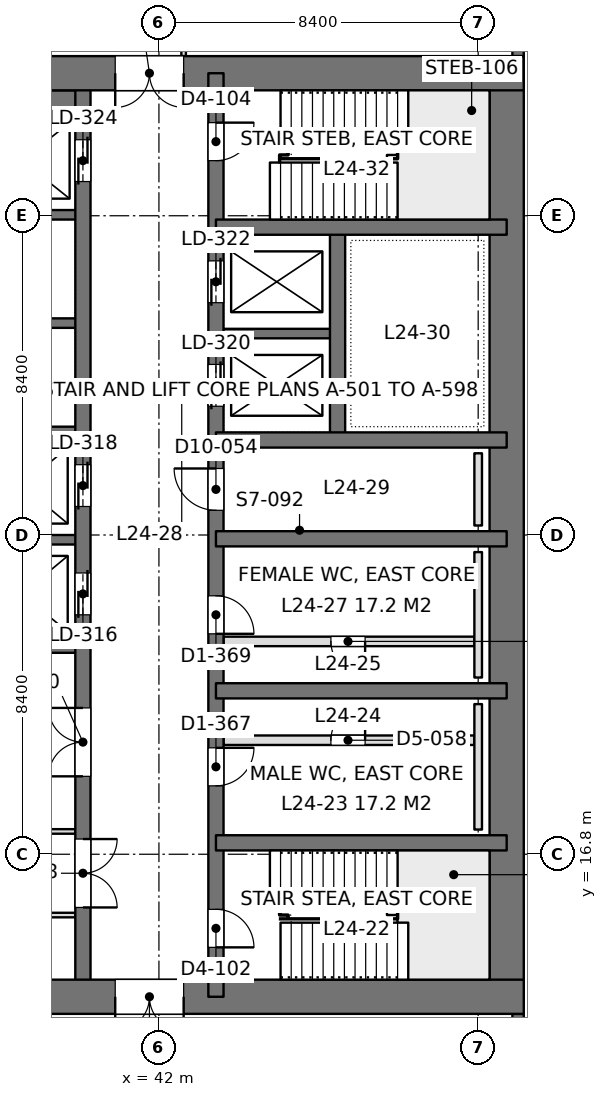
"""IFC4 building model, lengths in metres.
Left out: names, types, materials, properties, quantities, classifications, styles, units other than length and angle.
Written with IfcOpenShell. Run it as: python <this file> out.ifc"""

import sys

from ifc_helpers import new_model, si_unit, direction, frame, frame_2d, origin, place, context, subcontext, project, spatial, rectangle, extrude, element, fill, save


model = new_model("IFC4")
c1 = context("Model", 3, precision=1e-05, world=origin(), true_north=direction((0.0, 1.0)))
c2 = subcontext(c1, "Body", "Model", "MODEL_VIEW")
j1 = project(units=[si_unit("LENGTHUNIT", "METRE"), si_unit("PLANEANGLEUNIT", "RADIAN")], contexts=[c1])
p1 = place(None, origin())
s1 = spatial("IfcSite", under=j1, at=p1, CompositionType="ELEMENT")
p2 = place(p1, origin())
s2 = spatial("IfcBuilding", under=s1, at=p2, CompositionType="ELEMENT")
p3 = place(p2, frame((0.0, 0.0, 109.2)))
s3 = spatial("IfcBuildingStorey", under=s2, at=p3, CompositionType="ELEMENT", Elevation=109.2)
p4 = place(p3, frame((33.6, 13.05, 0.0), z_axis=(0.0, 0.0, 1.0), x_axis=(1.0, 0.0, 0.0)))
e1 = element("IfcWall", 1, at=p4, inside=s3, PredefinedType="SHEAR", context=c2, shape_type="SweptSolid", body=[
    extrude(rectangle(XDim=18.0, YDim=0.9, at=frame_2d((9.0, 0.0))), origin(), (0.0, 0.0, 1.0), 4.2),
])
p5 = place(p4, frame((7.25, 0.0, 0.0)))
e2 = element("IfcOpeningElement", 2, at=p5, cuts=e1, PredefinedType="OPENING", context=c2, shape_type="SweptSolid", body=[
    extrude(rectangle(XDim=1.8, YDim=2.4, at=frame_2d((0.9, 1.2))), frame((0.0, 0.46, 0.0), z_axis=(0.0, -1.0, 0.0), x_axis=(1.0, 0.0, 0.0)), (0.0, 0.0, 1.0), 0.92),
])
p6 = place(p3, frame((33.6, 37.35, 0.0), z_axis=(0.0, 0.0, 1.0), x_axis=(1.0, 0.0, 0.0)))
e3 = element("IfcWall", 3, at=p6, inside=s3, PredefinedType="SHEAR", context=c2, shape_type="SweptSolid", body=[
    extrude(rectangle(XDim=18.0, YDim=0.9, at=frame_2d((9.0, 0.0))), origin(), (0.0, 0.0, 1.0), 4.2),
])
p7 = place(p6, frame((7.25, 0.0, 0.0)))
e4 = element("IfcOpeningElement", 4, at=p7, cuts=e3, PredefinedType="OPENING", context=c2, shape_type="SweptSolid", body=[
    extrude(rectangle(XDim=1.8, YDim=2.4, at=frame_2d((0.9, 1.2))), frame((0.0, 0.46, 0.0), z_axis=(0.0, -1.0, 0.0), x_axis=(1.0, 0.0, 0.0)), (0.0, 0.0, 1.0), 0.92),
])
p8 = place(p3, frame((51.15, 13.05, 0.0), z_axis=(0.0, 0.0, 1.0), x_axis=(0.0, 1.0, 0.0)))
e5 = element("IfcWall", 5, at=p8, inside=s3, PredefinedType="SHEAR", context=c2, shape_type="SweptSolid", body=[
    extrude(rectangle(XDim=24.3, YDim=0.9, at=frame_2d((12.15, 0.0))), origin(), (0.0, 0.0, 1.0), 4.2),
])
p9 = place(p3, frame((43.5, 13.05, 0.0), z_axis=(0.0, 0.0, 1.0), x_axis=(0.0, 1.0, 0.0)))
e6 = element("IfcWall", 6, at=p9, inside=s3, PredefinedType="SHEAR", context=c2, shape_type="SweptSolid", body=[
    extrude(rectangle(XDim=24.3, YDim=0.4, at=frame_2d((12.15, 0.0))), origin(), (0.0, 0.0, 1.0), 4.2),
])
p10 = place(p9, frame((1.3, 0.0, 0.0)))
e7 = element("IfcOpeningElement", 7, at=p10, cuts=e6, PredefinedType="OPENING", context=c2, shape_type="SweptSolid", body=[
    extrude(rectangle(XDim=1.0, YDim=2.2, at=frame_2d((0.5, 1.1))), frame((0.0, 0.21, 0.0), z_axis=(0.0, -1.0, 0.0), x_axis=(1.0, 0.0, 0.0)), (0.0, 0.0, 1.0), 0.42),
])
p11 = place(p9, frame((22.0, 0.0, 0.0)))
e8 = element("IfcOpeningElement", 8, at=p11, cuts=e6, PredefinedType="OPENING", context=c2, shape_type="SweptSolid", body=[
    extrude(rectangle(XDim=1.0, YDim=2.2, at=frame_2d((0.5, 1.1))), frame((0.0, 0.21, 0.0), z_axis=(0.0, -1.0, 0.0), x_axis=(1.0, 0.0, 0.0)), (0.0, 0.0, 1.0), 0.42),
])
p12 = place(p9, frame((5.55, 0.0, 0.0)))
e9 = element("IfcOpeningElement", 9, at=p12, cuts=e6, PredefinedType="OPENING", context=c2, shape_type="SweptSolid", body=[
    extrude(rectangle(XDim=1.0, YDim=2.2, at=frame_2d((0.5, 1.1))), frame((0.0, 0.21, 0.0), z_axis=(0.0, -1.0, 0.0), x_axis=(1.0, 0.0, 0.0)), (0.0, 0.0, 1.0), 0.42),
])
p13 = place(p9, frame((9.55, 0.0, 0.0)))
e10 = element("IfcOpeningElement", 10, at=p13, cuts=e6, PredefinedType="OPENING", context=c2, shape_type="SweptSolid", body=[
    extrude(rectangle(XDim=1.0, YDim=2.2, at=frame_2d((0.5, 1.1))), frame((0.0, 0.21, 0.0), z_axis=(0.0, -1.0, 0.0), x_axis=(1.0, 0.0, 0.0)), (0.0, 0.0, 1.0), 0.42),
])
p14 = place(p9, frame((12.8, 0.0, 0.0)))
e11 = element("IfcOpeningElement", 11, at=p14, cuts=e6, PredefinedType="OPENING", context=c2, shape_type="SweptSolid", body=[
    extrude(rectangle(XDim=1.1, YDim=2.2, at=frame_2d((0.55, 1.1))), frame((0.0, 0.21, 0.0), z_axis=(0.0, -1.0, 0.0), x_axis=(1.0, 0.0, 0.0)), (0.0, 0.0, 1.0), 0.42),
])
p15 = place(p9, frame((15.538, 0.0, 0.0)))
e12 = element("IfcOpeningElement", 12, at=p15, cuts=e6, PredefinedType="OPENING", context=c2, shape_type="SweptSolid", body=[
    extrude(rectangle(XDim=1.1, YDim=2.2, at=frame_2d((0.55, 1.1))), frame((0.0, 0.21, 0.0), z_axis=(0.0, -1.0, 0.0), x_axis=(1.0, 0.0, 0.0)), (0.0, 0.0, 1.0), 0.42),
])
p16 = place(p9, frame((18.262, 0.0, 0.0)))
e13 = element("IfcOpeningElement", 13, at=p16, cuts=e6, PredefinedType="OPENING", context=c2, shape_type="SweptSolid", body=[
    extrude(rectangle(XDim=1.1, YDim=2.2, at=frame_2d((0.55, 1.1))), frame((0.0, 0.21, 0.0), z_axis=(0.0, -1.0, 0.0), x_axis=(1.0, 0.0, 0.0)), (0.0, 0.0, 1.0), 0.42),
])
p17 = place(p3, frame((40.0, 13.05, 0.0), z_axis=(0.0, 0.0, 1.0), x_axis=(0.0, 1.0, 0.0)))
e14 = element("IfcWall", 14, at=p17, inside=s3, PredefinedType="SHEAR", context=c2, shape_type="SweptSolid", body=[
    extrude(rectangle(XDim=24.3, YDim=0.4, at=frame_2d((12.15, 0.0))), origin(), (0.0, 0.0, 1.0), 4.2),
])
p18 = place(p17, frame((10.05, 0.0, 0.0)))
e15 = element("IfcOpeningElement", 15, at=p18, cuts=e14, PredefinedType="OPENING", context=c2, shape_type="SweptSolid", body=[
    extrude(rectangle(XDim=1.1, YDim=2.2, at=frame_2d((0.55, 1.1))), frame((0.0, 0.21, 0.0), z_axis=(0.0, -1.0, 0.0), x_axis=(1.0, 0.0, 0.0)), (0.0, 0.0, 1.0), 0.42),
])
p19 = place(p17, frame((12.9, 0.0, 0.0)))
e16 = element("IfcOpeningElement", 16, at=p19, cuts=e14, PredefinedType="OPENING", context=c2, shape_type="SweptSolid", body=[
    extrude(rectangle(XDim=1.1, YDim=2.2, at=frame_2d((0.55, 1.1))), frame((0.0, 0.21, 0.0), z_axis=(0.0, -1.0, 0.0), x_axis=(1.0, 0.0, 0.0)), (0.0, 0.0, 1.0), 0.42),
])
p20 = place(p17, frame((21.45, 0.0, 0.0)))
e17 = element("IfcOpeningElement", 17, at=p20, cuts=e14, PredefinedType="OPENING", context=c2, shape_type="SweptSolid", body=[
    extrude(rectangle(XDim=1.1, YDim=2.2, at=frame_2d((0.55, 1.1))), frame((0.0, 0.21, 0.0), z_axis=(0.0, -1.0, 0.0), x_axis=(1.0, 0.0, 0.0)), (0.0, 0.0, 1.0), 0.42),
])
p21 = place(p17, frame((2.35, 0.0, 0.0)))
e18 = element("IfcOpeningElement", 18, at=p21, cuts=e14, PredefinedType="OPENING", context=c2, shape_type="SweptSolid", body=[
    extrude(rectangle(XDim=1.8, YDim=2.4, at=frame_2d((0.9, 1.2))), frame((0.0, 0.21, 0.0), z_axis=(0.0, -1.0, 0.0), x_axis=(1.0, 0.0, 0.0)), (0.0, 0.0, 1.0), 0.42),
])
p22 = place(p17, frame((5.8, 0.0, 0.0)))
e19 = element("IfcOpeningElement", 19, at=p22, cuts=e14, PredefinedType="OPENING", context=c2, shape_type="SweptSolid", body=[
    extrude(rectangle(XDim=1.8, YDim=2.4, at=frame_2d((0.9, 1.2))), frame((0.0, 0.21, 0.0), z_axis=(0.0, -1.0, 0.0), x_axis=(1.0, 0.0, 0.0)), (0.0, 0.0, 1.0), 0.42),
])
for number, where, z_axis, x_axis in (
    (20, (51.15, 17.1, 0.0), (0.0, 0.0, 1.0), (-1.0, 0.0, 0.0)),
    (21, (51.15, 21.1, 0.0), (0.0, 0.0, 1.0), (-1.0, 0.0, 0.0)),
    (22, (51.15, 25.1, 0.0), (0.0, 0.0, 1.0), (-1.0, 0.0, 0.0)),
    (23, (51.15, 27.7, 0.0), (0.0, 0.0, 1.0), (-1.0, 0.0, 0.0)),
    (24, (51.15, 33.3, 0.0), (0.0, 0.0, 1.0), (-1.0, 0.0, 0.0)),
):
    element("IfcWall", number, at=place(p3, frame(where, z_axis=z_axis, x_axis=x_axis)), inside=s3, PredefinedType="SHEAR", context=c2, shape_type="SweptSolid", body=[
        extrude(rectangle(XDim=7.65, YDim=0.4, at=frame_2d((3.825, 0.0))), origin(), (0.0, 0.0, 1.0), 4.2),
    ])
p23 = place(p3, frame((46.7, 27.7, 0.0), z_axis=(0.0, 0.0, 1.0), x_axis=(0.0, 1.0, 0.0)))
e25 = element("IfcWall", 25, at=p23, inside=s3, PredefinedType="SHEAR", context=c2, shape_type="SweptSolid", body=[
    extrude(rectangle(XDim=5.6, YDim=0.4, at=frame_2d((2.8, 0.0))), origin(), (0.0, 0.0, 1.0), 4.2),
])
p24 = place(p3, frame((46.7, 30.5, 0.0), z_axis=(0.0, 0.0, 1.0), x_axis=(-1.0, 0.0, 0.0)))
e26 = element("IfcWall", 26, at=p24, inside=s3, PredefinedType="SHEAR", context=c2, shape_type="SweptSolid", body=[
    extrude(rectangle(XDim=3.2, YDim=0.25, at=frame_2d((1.6, 0.0))), origin(), (0.0, 0.0, 1.0), 4.2),
])
p25 = place(p3, frame((40.0, 22.225, 0.0), z_axis=(0.0, 0.0, 1.0), x_axis=(-1.0, 0.0, 0.0)))
e27 = element("IfcWall", 27, at=p25, inside=s3, PredefinedType="SHEAR", context=c2, shape_type="SweptSolid", body=[
    extrude(rectangle(XDim=5.95, YDim=0.25, at=frame_2d((2.975, 0.0))), origin(), (0.0, 0.0, 1.0), 4.2),
])
for number, where, z_axis, x_axis in (
    (28, (40.0, 25.075, 0.0), (0.0, 0.0, 1.0), (-1.0, 0.0, 0.0)),
    (29, (40.0, 27.925, 0.0), (0.0, 0.0, 1.0), (-1.0, 0.0, 0.0)),
    (30, (40.0, 30.775, 0.0), (0.0, 0.0, 1.0), (-1.0, 0.0, 0.0)),
    (31, (40.0, 33.625, 0.0), (0.0, 0.0, 1.0), (-1.0, 0.0, 0.0)),
):
    element("IfcWall", number, at=place(p3, frame(where, z_axis=z_axis, x_axis=x_axis)), inside=s3, PredefinedType="SHEAR", context=c2, shape_type="SweptSolid", body=[
        extrude(rectangle(XDim=3.2, YDim=0.25, at=frame_2d((1.6, 0.0))), origin(), (0.0, 0.0, 1.0), 4.2),
    ])
p26 = place(p3, frame((40.0, 36.625, 0.0), z_axis=(0.0, 0.0, 1.0), x_axis=(-1.0, 0.0, 0.0)))
e32 = element("IfcWall", 32, at=p26, inside=s3, PredefinedType="SHEAR", context=c2, shape_type="SweptSolid", body=[
    extrude(rectangle(XDim=3.2, YDim=0.55, at=frame_2d((1.6, 0.0))), origin(), (0.0, 0.0, 1.0), 4.2),
])
p27 = place(p3, frame((51.45, 42.0, 0.0), z_axis=(0.0, 0.0, 1.0), x_axis=(0.0, -1.0, 0.0)))
e33 = element("IfcWall", 33, at=p27, inside=s3, PredefinedType="SOLIDWALL", context=c2, shape_type="SweptSolid", body=[
    extrude(rectangle(XDim=4.2, YDim=0.3, at=frame_2d((2.1, 0.0))), origin(), (0.0, 0.0, 1.0), 4.05),
])
p28 = place(p27, frame((0.9, 0.0, 0.9)))
e34 = element("IfcOpeningElement", 34, at=p28, cuts=e33, PredefinedType="OPENING", context=c2, shape_type="SweptSolid", body=[
    extrude(rectangle(XDim=2.4, YDim=1.9, at=frame_2d((1.2, 0.95))), frame((0.0, 0.16, 0.0), z_axis=(0.0, -1.0, 0.0), x_axis=(1.0, 0.0, 0.0)), (0.0, 0.0, 1.0), 0.32),
])
p29 = place(p3, frame((51.45, 12.6, 0.0), z_axis=(0.0, 0.0, 1.0), x_axis=(0.0, -1.0, 0.0)))
e35 = element("IfcWall", 35, at=p29, inside=s3, PredefinedType="SOLIDWALL", context=c2, shape_type="SweptSolid", body=[
    extrude(rectangle(XDim=4.2, YDim=0.3, at=frame_2d((2.1, 0.0))), origin(), (0.0, 0.0, 1.0), 4.05),
])
p30 = place(p29, frame((0.9, 0.0, 0.9)))
e36 = element("IfcOpeningElement", 36, at=p30, cuts=e35, PredefinedType="OPENING", context=c2, shape_type="SweptSolid", body=[
    extrude(rectangle(XDim=2.4, YDim=1.9, at=frame_2d((1.2, 0.95))), frame((0.0, 0.16, 0.0), z_axis=(0.0, -1.0, 0.0), x_axis=(1.0, 0.0, 0.0)), (0.0, 0.0, 1.0), 0.32),
])
p31 = place(p3, frame((33.898, 17.4, 0.0), z_axis=(0.0, 0.0, 1.0), x_axis=(1.0, 0.0, 0.0)))
e37 = element("IfcWall", 37, at=p31, inside=s3, PredefinedType="PARTITIONING", context=c2, shape_type="SweptSolid", body=[
    extrude(rectangle(XDim=5.904, YDim=0.12, at=frame_2d((2.952, 0.0))), origin(), (0.0, 0.0, 1.0), 3.55),
])
p32 = place(p3, frame((33.598, 15.2, 0.0), z_axis=(0.0, 0.0, 1.0), x_axis=(1.0, 0.0, 0.0)))
e38 = element("IfcWall", 38, at=p32, inside=s3, PredefinedType="PARTITIONING", context=c2, shape_type="SweptSolid", body=[
    extrude(rectangle(XDim=6.204, YDim=0.12, at=frame_2d((3.102, 0.0))), origin(), (0.0, 0.0, 1.0), 3.55),
])
p33 = place(p3, frame((42.65, 37.8, 0.0), z_axis=(0.0, 0.0, 1.0), x_axis=(0.0, 1.0, 0.0)))
e39 = element("IfcWall", 39, at=p33, inside=s3, PredefinedType="PARTITIONING", context=c2, shape_type="SweptSolid", body=[
    extrude(rectangle(XDim=2.0, YDim=0.12, at=frame_2d((1.0, 0.0))), origin(), (0.0, 0.0, 1.0), 4.05),
])
p34 = place(p3, frame((43.7, 22.4, 0.0), z_axis=(0.0, 0.0, 1.0), x_axis=(1.0, 0.0, 0.0)))
e40 = element("IfcWall", 40, at=p34, inside=s3, PredefinedType="PARTITIONING", context=c2, shape_type="SweptSolid", body=[
    extrude(rectangle(XDim=6.6, YDim=0.25, at=frame_2d((3.3, 0.0))), origin(), (0.0, 0.0, 1.0), 4.0),
])
p35 = place(p34, frame((2.825, 0.0, 0.0)))
e41 = element("IfcOpeningElement", 41, at=p35, cuts=e40, PredefinedType="OPENING", context=c2, shape_type="SweptSolid", body=[
    extrude(rectangle(XDim=0.9, YDim=2.2, at=frame_2d((0.45, 1.1))), frame((0.0, 0.135, 0.0), z_axis=(0.0, -1.0, 0.0), x_axis=(1.0, 0.0, 0.0)), (0.0, 0.0, 1.0), 0.27),
])
p36 = place(p3, frame((43.7, 19.8, 0.0), z_axis=(0.0, 0.0, 1.0), x_axis=(1.0, 0.0, 0.0)))
e42 = element("IfcWall", 42, at=p36, inside=s3, PredefinedType="PARTITIONING", context=c2, shape_type="SweptSolid", body=[
    extrude(rectangle(XDim=6.6, YDim=0.25, at=frame_2d((3.3, 0.0))), origin(), (0.0, 0.0, 1.0), 4.0),
])
p37 = place(p36, frame((2.825, 0.0, 0.0)))
e43 = element("IfcOpeningElement", 43, at=p37, cuts=e42, PredefinedType="OPENING", context=c2, shape_type="SweptSolid", body=[
    extrude(rectangle(XDim=0.9, YDim=2.2, at=frame_2d((0.45, 1.1))), frame((0.0, 0.135, 0.0), z_axis=(0.0, -1.0, 0.0), x_axis=(1.0, 0.0, 0.0)), (0.0, 0.0, 1.0), 0.27),
])
for number, where, z_axis, x_axis in (
    (44, (50.4, 17.45, 0.0), (0.0, 0.0, 1.0), (0.0, 1.0, 0.0)),
    (45, (50.4, 21.45, 0.0), (0.0, 0.0, 1.0), (0.0, 1.0, 0.0)),
):
    element("IfcWall", number, at=place(p3, frame(where, z_axis=z_axis, x_axis=x_axis)), inside=s3, PredefinedType="PLUMBINGWALL", context=c2, shape_type="SweptSolid", body=[
        extrude(rectangle(XDim=3.3, YDim=0.2, at=frame_2d((1.65, 0.0))), origin(), (0.0, 0.0, 1.0), 1.2),
    ])
p38 = place(p3, frame((50.4, 25.45, 0.0), z_axis=(0.0, 0.0, 1.0), x_axis=(0.0, 1.0, 0.0)))
e46 = element("IfcWall", 46, at=p38, inside=s3, PredefinedType="PLUMBINGWALL", context=c2, shape_type="SweptSolid", body=[
    extrude(rectangle(XDim=1.9, YDim=0.2, at=frame_2d((0.95, 0.0))), origin(), (0.0, 0.0, 1.0), 1.2),
])
p39 = place(p5, frame((1.8, 0.0, 0.0), z_axis=(0.0, 0.0, 1.0), x_axis=(-1.0, 0.0, 0.0)))
e47 = element("IfcDoor", 47, at=p39, inside=s3, OperationType="DOUBLE_DOOR_SINGLE_SWING", PredefinedType="DOOR", context=c2, shape_type="SweptSolid", body=[
    extrude(rectangle(XDim=1.8, YDim=2.4, at=frame_2d((0.9, 1.2))), frame((0.0, 0.025, 0.0), z_axis=(0.0, -1.0, 0.0), x_axis=(1.0, 0.0, 0.0)), (0.0, 0.0, 1.0), 0.05),
])
fill(e2, e47)
p40 = place(p7, frame((1.8, 0.0, 0.0), z_axis=(0.0, 0.0, 1.0), x_axis=(-1.0, 0.0, 0.0)))
e48 = element("IfcDoor", 48, at=p40, inside=s3, OperationType="DOUBLE_DOOR_SINGLE_SWING", PredefinedType="DOOR", context=c2, shape_type="SweptSolid", body=[
    extrude(rectangle(XDim=1.8, YDim=2.4, at=frame_2d((0.9, 1.2))), frame((0.0, 0.025, 0.0), z_axis=(0.0, -1.0, 0.0), x_axis=(1.0, 0.0, 0.0)), (0.0, 0.0, 1.0), 0.05),
])
fill(e4, e48)
p41 = place(p10, frame((1.0, 0.0, 0.0), z_axis=(0.0, 0.0, 1.0), x_axis=(-1.0, 0.0, 0.0)))
e49 = element("IfcDoor", 49, at=p41, inside=s3, OperationType="SINGLE_SWING_RIGHT", PredefinedType="DOOR", context=c2, shape_type="SweptSolid", body=[
    extrude(rectangle(XDim=1.0, YDim=2.2, at=frame_2d((0.5, 1.1))), frame((0.0, 0.025, 0.0), z_axis=(0.0, -1.0, 0.0), x_axis=(1.0, 0.0, 0.0)), (0.0, 0.0, 1.0), 0.05),
])
fill(e7, e49)
p42 = place(p11, frame((1.0, 0.0, 0.0), z_axis=(0.0, 0.0, 1.0), x_axis=(-1.0, 0.0, 0.0)))
e50 = element("IfcDoor", 50, at=p42, inside=s3, OperationType="SINGLE_SWING_LEFT", PredefinedType="DOOR", context=c2, shape_type="SweptSolid", body=[
    extrude(rectangle(XDim=1.0, YDim=2.2, at=frame_2d((0.5, 1.1))), frame((0.0, 0.025, 0.0), z_axis=(0.0, -1.0, 0.0), x_axis=(1.0, 0.0, 0.0)), (0.0, 0.0, 1.0), 0.05),
])
fill(e8, e50)
p43 = place(p12, frame((1.0, 0.0, 0.0), z_axis=(0.0, 0.0, 1.0), x_axis=(-1.0, 0.0, 0.0)))
e51 = element("IfcDoor", 51, at=p43, inside=s3, OperationType="SINGLE_SWING_LEFT", PredefinedType="DOOR", context=c2, shape_type="SweptSolid", body=[
    extrude(rectangle(XDim=1.0, YDim=2.2, at=frame_2d((0.5, 1.1))), frame((0.0, 0.025, 0.0), z_axis=(0.0, -1.0, 0.0), x_axis=(1.0, 0.0, 0.0)), (0.0, 0.0, 1.0), 0.05),
])
fill(e9, e51)
p44 = place(p13, frame((1.0, 0.0, 0.0), z_axis=(0.0, 0.0, 1.0), x_axis=(-1.0, 0.0, 0.0)))
e52 = element("IfcDoor", 52, at=p44, inside=s3, OperationType="SINGLE_SWING_RIGHT", PredefinedType="DOOR", context=c2, shape_type="SweptSolid", body=[
    extrude(rectangle(XDim=1.0, YDim=2.2, at=frame_2d((0.5, 1.1))), frame((0.0, 0.025, 0.0), z_axis=(0.0, -1.0, 0.0), x_axis=(1.0, 0.0, 0.0)), (0.0, 0.0, 1.0), 0.05),
])
fill(e10, e52)
p45 = place(p14, origin())
e53 = element("IfcDoor", 53, at=p45, inside=s3, OperationType="SINGLE_SWING_RIGHT", PredefinedType="DOOR", context=c2, shape_type="SweptSolid", body=[
    extrude(rectangle(XDim=1.1, YDim=2.2, at=frame_2d((0.55, 1.1))), frame((0.0, 0.025, 0.0), z_axis=(0.0, -1.0, 0.0), x_axis=(1.0, 0.0, 0.0)), (0.0, 0.0, 1.0), 0.05),
])
fill(e11, e53)
p46 = place(p18, origin())
e54 = element("IfcDoor", 54, at=p46, inside=s3, OperationType="DOUBLE_DOOR_SLIDING", PredefinedType="DOOR", context=c2, shape_type="SweptSolid", body=[
    extrude(rectangle(XDim=1.1, YDim=2.2, at=frame_2d((0.55, 1.1))), frame((0.0, 0.025, 0.0), z_axis=(0.0, -1.0, 0.0), x_axis=(1.0, 0.0, 0.0)), (0.0, 0.0, 1.0), 0.05),
])
fill(e15, e54)
p47 = place(p19, origin())
e55 = element("IfcDoor", 55, at=p47, inside=s3, OperationType="DOUBLE_DOOR_SLIDING", PredefinedType="DOOR", context=c2, shape_type="SweptSolid", body=[
    extrude(rectangle(XDim=1.1, YDim=2.2, at=frame_2d((0.55, 1.1))), frame((0.0, 0.025, 0.0), z_axis=(0.0, -1.0, 0.0), x_axis=(1.0, 0.0, 0.0)), (0.0, 0.0, 1.0), 0.05),
])
fill(e16, e55)
p48 = place(p20, origin())
e56 = element("IfcDoor", 56, at=p48, inside=s3, OperationType="DOUBLE_DOOR_SLIDING", PredefinedType="DOOR", context=c2, shape_type="SweptSolid", body=[
    extrude(rectangle(XDim=1.1, YDim=2.2, at=frame_2d((0.55, 1.1))), frame((0.0, 0.025, 0.0), z_axis=(0.0, -1.0, 0.0), x_axis=(1.0, 0.0, 0.0)), (0.0, 0.0, 1.0), 0.05),
])
fill(e17, e56)
p49 = place(p15, origin())
e57 = element("IfcDoor", 57, at=p49, inside=s3, OperationType="DOUBLE_DOOR_SLIDING", PredefinedType="DOOR", context=c2, shape_type="SweptSolid", body=[
    extrude(rectangle(XDim=1.1, YDim=2.2, at=frame_2d((0.55, 1.1))), frame((0.0, 0.025, 0.0), z_axis=(0.0, -1.0, 0.0), x_axis=(1.0, 0.0, 0.0)), (0.0, 0.0, 1.0), 0.05),
])
fill(e12, e57)
p50 = place(p16, origin())
e58 = element("IfcDoor", 58, at=p50, inside=s3, OperationType="DOUBLE_DOOR_SLIDING", PredefinedType="DOOR", context=c2, shape_type="SweptSolid", body=[
    extrude(rectangle(XDim=1.1, YDim=2.2, at=frame_2d((0.55, 1.1))), frame((0.0, 0.025, 0.0), z_axis=(0.0, -1.0, 0.0), x_axis=(1.0, 0.0, 0.0)), (0.0, 0.0, 1.0), 0.05),
])
fill(e13, e58)
p51 = place(p21, frame((1.8, 0.0, 0.0), z_axis=(0.0, 0.0, 1.0), x_axis=(-1.0, 0.0, 0.0)))
e59 = element("IfcDoor", 59, at=p51, inside=s3, OperationType="DOUBLE_DOOR_SINGLE_SWING", PredefinedType="DOOR", context=c2, shape_type="SweptSolid", body=[
    extrude(rectangle(XDim=1.8, YDim=2.4, at=frame_2d((0.9, 1.2))), frame((0.0, 0.025, 0.0), z_axis=(0.0, -1.0, 0.0), x_axis=(1.0, 0.0, 0.0)), (0.0, 0.0, 1.0), 0.05),
])
fill(e18, e59)
p52 = place(p22, origin())
e60 = element("IfcDoor", 60, at=p52, inside=s3, OperationType="DOUBLE_DOOR_SINGLE_SWING", PredefinedType="DOOR", context=c2, shape_type="SweptSolid", body=[
    extrude(rectangle(XDim=1.8, YDim=2.4, at=frame_2d((0.9, 1.2))), frame((0.0, 0.025, 0.0), z_axis=(0.0, -1.0, 0.0), x_axis=(1.0, 0.0, 0.0)), (0.0, 0.0, 1.0), 0.05),
])
fill(e19, e60)
p53 = place(p35, frame((0.9, 0.0, 0.0), z_axis=(0.0, 0.0, 1.0), x_axis=(-1.0, 0.0, 0.0)))
e61 = element("IfcDoor", 61, at=p53, inside=s3, OperationType="SINGLE_SWING_LEFT", PredefinedType="DOOR", context=c2, shape_type="SweptSolid", body=[
    extrude(rectangle(XDim=0.9, YDim=2.2, at=frame_2d((0.45, 1.1))), frame((0.0, 0.025, 0.0), z_axis=(0.0, -1.0, 0.0), x_axis=(1.0, 0.0, 0.0)), (0.0, 0.0, 1.0), 0.05),
])
fill(e41, e61)
p54 = place(p37, origin())
e62 = element("IfcDoor", 62, at=p54, inside=s3, OperationType="SINGLE_SWING_RIGHT", PredefinedType="DOOR", context=c2, shape_type="SweptSolid", body=[
    extrude(rectangle(XDim=0.9, YDim=2.2, at=frame_2d((0.45, 1.1))), frame((0.0, 0.025, 0.0), z_axis=(0.0, -1.0, 0.0), x_axis=(1.0, 0.0, 0.0)), (0.0, 0.0, 1.0), 0.05),
])
fill(e43, e62)
save(model, sys.argv[1])
